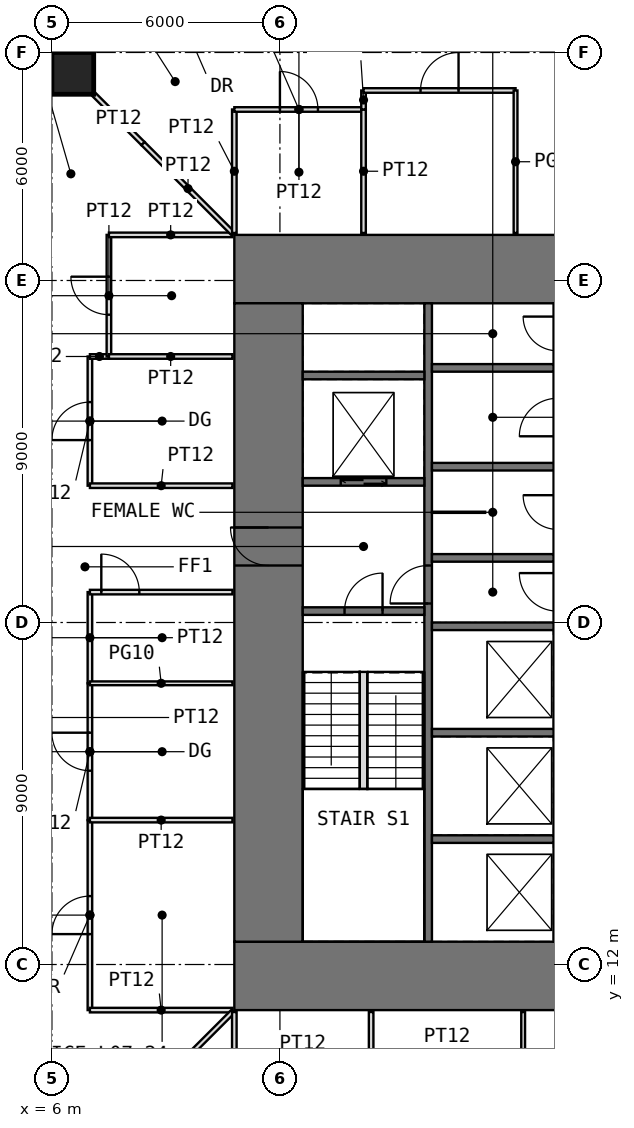
"""IFC4 building model, lengths in metres.
Left out: names, types, materials, properties, quantities, classifications, styles, units other than length and angle.
Written with IfcOpenShell. Run it as: python <this file> out.ifc"""

import sys

from ifc_helpers import new_model, si_unit, direction, frame, frame_2d, origin, origin_2d, place, context, subcontext, project, spatial, rectangle, extrude, element, fill, save


model = new_model("IFC4")
c1 = context("Model", 3, precision=1e-05, world=origin(), true_north=direction((0.0, 1.0)))
c2 = subcontext(c1, "Body", "Model", "MODEL_VIEW")
j1 = project(units=[si_unit("LENGTHUNIT", "METRE"), si_unit("PLANEANGLEUNIT", "RADIAN")], contexts=[c1])
p1 = place(None, origin())
s1 = spatial("IfcSite", under=j1, at=p1, CompositionType="ELEMENT")
p2 = place(p1, origin())
s2 = spatial("IfcBuilding", under=s1, at=p2, CompositionType="ELEMENT")
p3 = place(p2, frame((0.0, 0.0, 34.5)))
s3 = spatial("IfcBuildingStorey", under=s2, at=p3, CompositionType="ELEMENT", Elevation=34.5)
p4 = place(p3, frame((6.55, 35.45, 0.0), z_axis=(0.0, 0.0, 1.0), x_axis=(1.0, 0.0, 0.0)))
e1 = element("IfcColumn", 1, at=p4, inside=s3, PredefinedType="COLUMN", context=c2, shape_type="SweptSolid", body=[
    extrude(rectangle(XDim=1.1, YDim=1.1, at=origin_2d()), origin(), (0.0, 0.0, 1.0), 4.0),
])
p5 = place(p3, frame((10.8, 11.7, -0.05), z_axis=(0.0, 0.0, 1.0), x_axis=(1.0, 0.0, 0.0)))
e2 = element("IfcWall", 2, at=p5, inside=s3, PredefinedType="SHEAR", context=c2, shape_type="SweptSolid", body=[
    extrude(rectangle(XDim=20.4, YDim=1.8, at=frame_2d((10.2, 0.0))), origin(), (0.0, 0.0, 1.0), 4.0),
])
p6 = place(p5, frame((9.2, 0.0, 0.05)))
e3 = element("IfcOpeningElement", 3, at=p6, cuts=e2, PredefinedType="OPENING", context=c2, shape_type="SweptSolid", body=[
    extrude(rectangle(XDim=2.0, YDim=2.2, at=frame_2d((1.0, 1.1))), frame((0.0, 0.91, 0.0), z_axis=(0.0, -1.0, 0.0), x_axis=(1.0, 0.0, 0.0)), (0.0, 0.0, 1.0), 1.82),
])
p7 = place(p3, frame((10.8, 30.3, -0.05), z_axis=(0.0, 0.0, 1.0), x_axis=(1.0, 0.0, 0.0)))
e4 = element("IfcWall", 4, at=p7, inside=s3, PredefinedType="SHEAR", context=c2, shape_type="SweptSolid", body=[
    extrude(rectangle(XDim=20.4, YDim=1.8, at=frame_2d((10.2, 0.0))), origin(), (0.0, 0.0, 1.0), 4.0),
])
p8 = place(p7, frame((9.2, 0.0, 0.05)))
e5 = element("IfcOpeningElement", 5, at=p8, cuts=e4, PredefinedType="OPENING", context=c2, shape_type="SweptSolid", body=[
    extrude(rectangle(XDim=2.0, YDim=2.2, at=frame_2d((1.0, 1.1))), frame((0.0, 0.91, 0.0), z_axis=(0.0, -1.0, 0.0), x_axis=(1.0, 0.0, 0.0)), (0.0, 0.0, 1.0), 1.82),
])
p9 = place(p3, frame((11.7, 12.6, -0.05), z_axis=(0.0, 0.0, 1.0), x_axis=(0.0, 1.0, 0.0)))
e6 = element("IfcWall", 6, at=p9, inside=s3, PredefinedType="SHEAR", context=c2, shape_type="SweptSolid", body=[
    extrude(rectangle(XDim=16.8, YDim=1.8, at=frame_2d((8.4, 0.0))), origin(), (0.0, 0.0, 1.0), 4.0),
])
p10 = place(p9, frame((9.9, 0.0, 0.05)))
e7 = element("IfcOpeningElement", 7, at=p10, cuts=e6, PredefinedType="OPENING", context=c2, shape_type="SweptSolid", body=[
    extrude(rectangle(XDim=1.0, YDim=2.2, at=frame_2d((0.5, 1.1))), frame((0.0, 0.91, 0.0), z_axis=(0.0, -1.0, 0.0), x_axis=(1.0, 0.0, 0.0)), (0.0, 0.0, 1.0), 1.82),
])
p11 = place(p3, frame((15.9, 12.6, -0.05), z_axis=(0.0, 0.0, 1.0), x_axis=(0.0, 1.0, 0.0)))
e8 = element("IfcWall", 8, at=p11, inside=s3, PredefinedType="SHEAR", context=c2, shape_type="SweptSolid", body=[
    extrude(rectangle(XDim=16.8, YDim=0.2, at=frame_2d((8.4, 0.0))), origin(), (0.0, 0.0, 1.0), 4.0),
])
p12 = place(p11, frame((8.9, 0.0, 0.05)))
e9 = element("IfcOpeningElement", 9, at=p12, cuts=e8, PredefinedType="OPENING", context=c2, shape_type="SweptSolid", body=[
    extrude(rectangle(XDim=1.0, YDim=2.2, at=frame_2d((0.5, 1.1))), frame((0.0, 0.11, 0.0), z_axis=(0.0, -1.0, 0.0), x_axis=(1.0, 0.0, 0.0)), (0.0, 0.0, 1.0), 0.22),
])
p13 = place(p3, frame((12.6, 21.3, -0.05), z_axis=(0.0, 0.0, 1.0), x_axis=(1.0, 0.0, 0.0)))
e10 = element("IfcWall", 10, at=p13, inside=s3, PredefinedType="SHEAR", context=c2, shape_type="SweptSolid", body=[
    extrude(rectangle(XDim=3.2, YDim=0.2, at=frame_2d((1.6, 0.0))), origin(), (0.0, 0.0, 1.0), 4.0),
])
p14 = place(p13, frame((1.1, 0.0, 0.05)))
e11 = element("IfcOpeningElement", 11, at=p14, cuts=e10, PredefinedType="OPENING", context=c2, shape_type="SweptSolid", body=[
    extrude(rectangle(XDim=1.0, YDim=2.2, at=frame_2d((0.5, 1.1))), frame((0.0, 0.11, 0.0), z_axis=(0.0, -1.0, 0.0), x_axis=(1.0, 0.0, 0.0)), (0.0, 0.0, 1.0), 0.22),
])
p15 = place(p3, frame((12.6, 24.7, -0.05), z_axis=(0.0, 0.0, 1.0), x_axis=(1.0, 0.0, 0.0)))
e12 = element("IfcWall", 12, at=p15, inside=s3, PredefinedType="SHEAR", context=c2, shape_type="SweptSolid", body=[
    extrude(rectangle(XDim=3.2, YDim=0.2, at=frame_2d((1.6, 0.0))), origin(), (0.0, 0.0, 1.0), 4.0),
])
p16 = place(p15, frame((1.0, 0.0, 0.05)))
e13 = element("IfcOpeningElement", 13, at=p16, cuts=e12, PredefinedType="OPENING", context=c2, shape_type="SweptSolid", body=[
    extrude(rectangle(XDim=1.2, YDim=2.2, at=frame_2d((0.6, 1.1))), frame((0.0, 0.11, 0.0), z_axis=(0.0, -1.0, 0.0), x_axis=(1.0, 0.0, 0.0)), (0.0, 0.0, 1.0), 0.22),
])
for number, where, z_axis, x_axis in (
    (14, (12.6, 27.5, -0.05), (0.0, 0.0, 1.0), (1.0, 0.0, 0.0)),
    (15, (16.0, 15.3, -0.05), (0.0, 0.0, 1.0), (1.0, 0.0, 0.0)),
    (16, (16.0, 18.1, -0.05), (0.0, 0.0, 1.0), (1.0, 0.0, 0.0)),
    (17, (16.0, 20.9, -0.05), (0.0, 0.0, 1.0), (1.0, 0.0, 0.0)),
    (18, (16.0, 22.7, -0.05), (0.0, 0.0, 1.0), (1.0, 0.0, 0.0)),
    (19, (16.0, 25.1, -0.05), (0.0, 0.0, 1.0), (1.0, 0.0, 0.0)),
    (20, (16.0, 27.7, -0.05), (0.0, 0.0, 1.0), (1.0, 0.0, 0.0)),
):
    element("IfcWall", number, at=place(p3, frame(where, z_axis=z_axis, x_axis=x_axis)), inside=s3, PredefinedType="SHEAR", context=c2, shape_type="SweptSolid", body=[
        extrude(rectangle(XDim=3.2, YDim=0.2, at=frame_2d((1.6, 0.0))), origin(), (0.0, 0.0, 1.0), 4.0),
    ])
p17 = place(p3, frame((16.0, 23.9, 0.0), z_axis=(0.0, 0.0, 1.0), x_axis=(1.0, 0.0, 0.0)))
e21 = element("IfcWall", 21, at=p17, inside=s3, PredefinedType="PARTITIONING", context=c2, shape_type="SweptSolid", body=[
    extrude(rectangle(XDim=1.4, YDim=0.03, at=frame_2d((0.7, 0.0))), origin(), (0.0, 0.0, 1.0), 3.75),
])
p18 = place(p3, frame((7.0, 10.8, 0.0), z_axis=(0.0, 0.0, 1.0), x_axis=(0.0, 1.0, 0.0)))
e22 = element("IfcWall", 22, at=p18, inside=s3, PredefinedType="PARTITIONING", context=c2, shape_type="SweptSolid", body=[
    extrude(rectangle(XDim=5.0, YDim=0.12, at=frame_2d((2.5, 0.0))), origin(), (0.0, 0.0, 1.0), 3.75),
])
p19 = place(p18, frame((2.0, 0.0, 0.0)))
e23 = element("IfcOpeningElement", 23, at=p19, cuts=e22, PredefinedType="OPENING", context=c2, shape_type="SweptSolid", body=[
    extrude(rectangle(XDim=1.0, YDim=2.2, at=frame_2d((0.5, 1.1))), frame((0.0, 0.07, 0.0), z_axis=(0.0, -1.0, 0.0), x_axis=(1.0, 0.0, 0.0)), (0.0, 0.0, 1.0), 0.14),
])
p20 = place(p3, frame((7.0, 10.8, 0.0), z_axis=(0.0, 0.0, 1.0), x_axis=(1.0, 0.0, 0.0)))
e24 = element("IfcWall", 24, at=p20, inside=s3, PredefinedType="PARTITIONING", context=c2, shape_type="SweptSolid", body=[
    extrude(rectangle(XDim=3.75, YDim=0.12, at=frame_2d((1.875, 0.0))), origin(), (0.0, 0.0, 1.0), 3.75),
])
p21 = place(p3, frame((7.0, 15.8, 0.0), z_axis=(0.0, 0.0, 1.0), x_axis=(0.0, 1.0, 0.0)))
e25 = element("IfcWall", 25, at=p21, inside=s3, PredefinedType="PARTITIONING", context=c2, shape_type="SweptSolid", body=[
    extrude(rectangle(XDim=3.6, YDim=0.12, at=frame_2d((1.8, 0.0))), origin(), (0.0, 0.0, 1.0), 3.75),
])
p22 = place(p21, frame((1.3, 0.0, 0.0)))
e26 = element("IfcOpeningElement", 26, at=p22, cuts=e25, PredefinedType="OPENING", context=c2, shape_type="SweptSolid", body=[
    extrude(rectangle(XDim=1.0, YDim=2.4, at=frame_2d((0.5, 1.2))), frame((0.0, 0.07, 0.0), z_axis=(0.0, -1.0, 0.0), x_axis=(1.0, 0.0, 0.0)), (0.0, 0.0, 1.0), 0.14),
])
p23 = place(p3, frame((7.0, 15.8, 0.0), z_axis=(0.0, 0.0, 1.0), x_axis=(1.0, 0.0, 0.0)))
e27 = element("IfcWall", 27, at=p23, inside=s3, PredefinedType="PARTITIONING", context=c2, shape_type="SweptSolid", body=[
    extrude(rectangle(XDim=3.75, YDim=0.12, at=frame_2d((1.875, 0.0))), origin(), (0.0, 0.0, 1.0), 3.75),
])
p24 = place(p3, frame((7.0, 19.4, 0.0), z_axis=(0.0, 0.0, 1.0), x_axis=(0.0, 1.0, 0.0)))
e28 = element("IfcWall", 28, at=p24, inside=s3, PredefinedType="PARTITIONING", context=c2, shape_type="SweptSolid", body=[
    extrude(rectangle(XDim=2.4, YDim=0.12, at=frame_2d((1.2, 0.0))), origin(), (0.0, 0.0, 1.0), 3.75),
])
p25 = place(p3, frame((7.0, 19.4, 0.0), z_axis=(0.0, 0.0, 1.0), x_axis=(1.0, 0.0, 0.0)))
e29 = element("IfcWall", 29, at=p25, inside=s3, PredefinedType="PARTITIONING", context=c2, shape_type="SweptSolid", body=[
    extrude(rectangle(XDim=3.75, YDim=0.1, at=frame_2d((1.875, 0.0))), origin(), (0.0, 0.0, 1.0), 3.75),
])
p26 = place(p3, frame((7.0, 21.8, 0.0), z_axis=(0.0, 0.0, 1.0), x_axis=(1.0, 0.0, 0.0)))
e30 = element("IfcWall", 30, at=p26, inside=s3, PredefinedType="PARTITIONING", context=c2, shape_type="SweptSolid", body=[
    extrude(rectangle(XDim=3.75, YDim=0.12, at=frame_2d((1.875, 0.0))), origin(), (0.0, 0.0, 1.0), 3.75),
])
p27 = place(p26, frame((0.3, 0.0, 0.0)))
e31 = element("IfcOpeningElement", 31, at=p27, cuts=e30, PredefinedType="OPENING", context=c2, shape_type="SweptSolid", body=[
    extrude(rectangle(XDim=1.0, YDim=2.4, at=frame_2d((0.5, 1.2))), frame((0.0, 0.07, 0.0), z_axis=(0.0, -1.0, 0.0), x_axis=(1.0, 0.0, 0.0)), (0.0, 0.0, 1.0), 0.14),
])
p28 = place(p3, frame((7.0, 24.6, 0.0), z_axis=(0.0, 0.0, 1.0), x_axis=(0.0, 1.0, 0.0)))
e32 = element("IfcWall", 32, at=p28, inside=s3, PredefinedType="PARTITIONING", context=c2, shape_type="SweptSolid", body=[
    extrude(rectangle(XDim=3.4, YDim=0.12, at=frame_2d((1.7, 0.0))), origin(), (0.0, 0.0, 1.0), 3.75),
])
p29 = place(p28, frame((1.2, 0.0, 0.0)))
e33 = element("IfcOpeningElement", 33, at=p29, cuts=e32, PredefinedType="OPENING", context=c2, shape_type="SweptSolid", body=[
    extrude(rectangle(XDim=1.0, YDim=2.4, at=frame_2d((0.5, 1.2))), frame((0.0, 0.07, 0.0), z_axis=(0.0, -1.0, 0.0), x_axis=(1.0, 0.0, 0.0)), (0.0, 0.0, 1.0), 0.14),
])
p30 = place(p3, frame((7.0, 24.6, 0.0), z_axis=(0.0, 0.0, 1.0), x_axis=(1.0, 0.0, 0.0)))
e34 = element("IfcWall", 34, at=p30, inside=s3, PredefinedType="PARTITIONING", context=c2, shape_type="SweptSolid", body=[
    extrude(rectangle(XDim=3.75, YDim=0.12, at=frame_2d((1.875, 0.0))), origin(), (0.0, 0.0, 1.0), 3.75),
])
p31 = place(p3, frame((7.0, 28.0, 0.0), z_axis=(0.0, 0.0, 1.0), x_axis=(1.0, 0.0, 0.0)))
e35 = element("IfcWall", 35, at=p31, inside=s3, PredefinedType="PARTITIONING", context=c2, shape_type="SweptSolid", body=[
    extrude(rectangle(XDim=0.5, YDim=0.12, at=frame_2d((0.25, 0.0))), origin(), (0.0, 0.0, 1.0), 3.75),
])
p32 = place(p3, frame((7.11, 7.11, 0.0), z_axis=(0.0, 0.0, 1.0), x_axis=(0.707106781187, 0.707106781187, 0.0)))
e36 = element("IfcWall", 36, at=p32, inside=s3, PredefinedType="PARTITIONING", context=c2, shape_type="SweptSolid", body=[
    extrude(rectangle(XDim=5.168, YDim=0.12, at=frame_2d((2.584, 0.0))), origin(), (0.0, 0.0, 1.0), 3.75),
])
p33 = place(p3, frame((7.11, 34.89, 0.0), z_axis=(0.0, 0.0, 1.0), x_axis=(0.707106781187, -0.707106781187, 0.0)))
e37 = element("IfcWall", 37, at=p33, inside=s3, PredefinedType="PARTITIONING", context=c2, shape_type="SweptSolid", body=[
    extrude(rectangle(XDim=1.822, YDim=0.12, at=frame_2d((0.911, 0.0))), origin(), (0.0, 0.0, 1.0), 3.75),
])
p34 = place(p3, frame((7.5, 28.0, 0.0), z_axis=(0.0, 0.0, 1.0), x_axis=(0.0, 1.0, 0.0)))
e38 = element("IfcWall", 38, at=p34, inside=s3, PredefinedType="PARTITIONING", context=c2, shape_type="SweptSolid", body=[
    extrude(rectangle(XDim=3.2, YDim=0.12, at=frame_2d((1.6, 0.0))), origin(), (0.0, 0.0, 1.0), 3.75),
])
p35 = place(p34, frame((1.1, 0.0, 0.0)))
e39 = element("IfcOpeningElement", 39, at=p35, cuts=e38, PredefinedType="OPENING", context=c2, shape_type="SweptSolid", body=[
    extrude(rectangle(XDim=1.0, YDim=2.2, at=frame_2d((0.5, 1.1))), frame((0.0, 0.07, 0.0), z_axis=(0.0, -1.0, 0.0), x_axis=(1.0, 0.0, 0.0)), (0.0, 0.0, 1.0), 0.14),
])
for number, where, z_axis, x_axis in (
    (40, (7.5, 28.0, 0.0), (0.0, 0.0, 1.0), (1.0, 0.0, 0.0)),
    (41, (7.5, 31.2, 0.0), (0.0, 0.0, 1.0), (1.0, 0.0, 0.0)),
):
    element("IfcWall", number, at=place(p3, frame(where, z_axis=z_axis, x_axis=x_axis)), inside=s3, PredefinedType="PARTITIONING", context=c2, shape_type="SweptSolid", body=[
        extrude(rectangle(XDim=3.25, YDim=0.12, at=frame_2d((1.625, 0.0))), origin(), (0.0, 0.0, 1.0), 3.75),
    ])
p36 = place(p3, frame((8.398, 33.602, 0.0), z_axis=(0.0, 0.0, 1.0), x_axis=(0.707106781187, -0.707106781187, 0.0)))
e42 = element("IfcWall", 42, at=p36, inside=s3, PredefinedType="PARTITIONING", context=c2, shape_type="SweptSolid", body=[
    extrude(rectangle(XDim=3.346, YDim=0.12, at=frame_2d((1.673, 0.0))), origin(), (0.0, 0.0, 1.0), 3.75),
])
p37 = place(p3, frame((10.8, 7.7, 0.0), z_axis=(0.0, 0.0, 1.0), x_axis=(0.0, 1.0, 0.0)))
e43 = element("IfcWall", 43, at=p37, inside=s3, PredefinedType="PARTITIONING", context=c2, shape_type="SweptSolid", body=[
    extrude(rectangle(XDim=3.05, YDim=0.12, at=frame_2d((1.525, 0.0))), origin(), (0.0, 0.0, 1.0), 3.75),
])
p38 = place(p3, frame((10.8, 31.25, 0.0), z_axis=(0.0, 0.0, 1.0), x_axis=(0.0, 1.0, 0.0)))
e44 = element("IfcWall", 44, at=p38, inside=s3, PredefinedType="PARTITIONING", context=c2, shape_type="SweptSolid", body=[
    extrude(rectangle(XDim=3.25, YDim=0.12, at=frame_2d((1.625, 0.0))), origin(), (0.0, 0.0, 1.0), 3.75),
])
p39 = place(p3, frame((10.8, 34.5, 0.0), z_axis=(0.0, 0.0, 1.0), x_axis=(1.0, 0.0, 0.0)))
e45 = element("IfcWall", 45, at=p39, inside=s3, PredefinedType="PARTITIONING", context=c2, shape_type="SweptSolid", body=[
    extrude(rectangle(XDim=3.4, YDim=0.12, at=frame_2d((1.7, 0.0))), origin(), (0.0, 0.0, 1.0), 3.75),
])
p40 = place(p39, frame((1.2, 0.0, 0.0)))
e46 = element("IfcOpeningElement", 46, at=p40, cuts=e45, PredefinedType="OPENING", context=c2, shape_type="SweptSolid", body=[
    extrude(rectangle(XDim=1.0, YDim=2.2, at=frame_2d((0.5, 1.1))), frame((0.0, 0.07, 0.0), z_axis=(0.0, -1.0, 0.0), x_axis=(1.0, 0.0, 0.0)), (0.0, 0.0, 1.0), 0.14),
])
p41 = place(p3, frame((14.2, 31.25, 0.0), z_axis=(0.0, 0.0, 1.0), x_axis=(0.0, 1.0, 0.0)))
e47 = element("IfcWall", 47, at=p41, inside=s3, PredefinedType="PARTITIONING", context=c2, shape_type="SweptSolid", body=[
    extrude(rectangle(XDim=3.25, YDim=0.12, at=frame_2d((1.625, 0.0))), origin(), (0.0, 0.0, 1.0), 3.75),
])
p42 = place(p3, frame((14.2, 34.5, 0.0), z_axis=(0.0, 0.0, 1.0), x_axis=(0.0, 1.0, 0.0)))
e48 = element("IfcWall", 48, at=p42, inside=s3, PredefinedType="PARTITIONING", context=c2, shape_type="SweptSolid", body=[
    extrude(rectangle(XDim=0.5, YDim=0.12, at=frame_2d((0.25, 0.0))), origin(), (0.0, 0.0, 1.0), 3.75),
])
p43 = place(p3, frame((14.2, 35.0, 0.0), z_axis=(0.0, 0.0, 1.0), x_axis=(1.0, 0.0, 0.0)))
e49 = element("IfcWall", 49, at=p43, inside=s3, PredefinedType="PARTITIONING", context=c2, shape_type="SweptSolid", body=[
    extrude(rectangle(XDim=4.0, YDim=0.12, at=frame_2d((2.0, 0.0))), origin(), (0.0, 0.0, 1.0), 3.75),
])
p44 = place(p43, frame((1.5, 0.0, 0.0)))
e50 = element("IfcOpeningElement", 50, at=p44, cuts=e49, PredefinedType="OPENING", context=c2, shape_type="SweptSolid", body=[
    extrude(rectangle(XDim=1.0, YDim=2.4, at=frame_2d((0.5, 1.2))), frame((0.0, 0.07, 0.0), z_axis=(0.0, -1.0, 0.0), x_axis=(1.0, 0.0, 0.0)), (0.0, 0.0, 1.0), 0.14),
])
p45 = place(p3, frame((14.4, 7.7, 0.0), z_axis=(0.0, 0.0, 1.0), x_axis=(0.0, 1.0, 0.0)))
e51 = element("IfcWall", 51, at=p45, inside=s3, PredefinedType="PARTITIONING", context=c2, shape_type="SweptSolid", body=[
    extrude(rectangle(XDim=3.05, YDim=0.12, at=frame_2d((1.525, 0.0))), origin(), (0.0, 0.0, 1.0), 3.75),
])
p46 = place(p3, frame((18.2, 31.25, 0.0), z_axis=(0.0, 0.0, 1.0), x_axis=(0.0, 1.0, 0.0)))
e52 = element("IfcWall", 52, at=p46, inside=s3, PredefinedType="PARTITIONING", context=c2, shape_type="SweptSolid", body=[
    extrude(rectangle(XDim=3.75, YDim=0.1, at=frame_2d((1.875, 0.0))), origin(), (0.0, 0.0, 1.0), 3.75),
])
p47 = place(p3, frame((18.4, 7.2, 0.0), z_axis=(0.0, 0.0, 1.0), x_axis=(0.0, 1.0, 0.0)))
e53 = element("IfcWall", 53, at=p47, inside=s3, PredefinedType="PARTITIONING", context=c2, shape_type="SweptSolid", body=[
    extrude(rectangle(XDim=3.55, YDim=0.1, at=frame_2d((1.775, 0.0))), origin(), (0.0, 0.0, 1.0), 3.75),
])
p48 = place(p3, frame((14.2, 16.62, 0.0), z_axis=(0.0, 0.0, 1.0), x_axis=(0.0, 1.0, 0.0)))
e54 = element("IfcWall", 54, at=p48, inside=s3, PredefinedType="PARTITIONING", context=c2, shape_type="SweptSolid", body=[
    extrude(rectangle(XDim=3.08, YDim=0.2, at=frame_2d((1.54, 0.0))), origin(), (0.0, 0.0, 1.0), 4.0),
])
p49 = place(p10, origin())
e55 = element("IfcDoor", 55, at=p49, inside=s3, OperationType="SINGLE_SWING_RIGHT", PredefinedType="DOOR", context=c2, shape_type="SweptSolid", body=[
    extrude(rectangle(XDim=1.0, YDim=2.2, at=frame_2d((0.5, 1.1))), frame((0.0, 0.025, 0.0), z_axis=(0.0, -1.0, 0.0), x_axis=(1.0, 0.0, 0.0)), (0.0, 0.0, 1.0), 0.05),
])
fill(e7, e55)
p50 = place(p14, origin())
e56 = element("IfcDoor", 56, at=p50, inside=s3, OperationType="SINGLE_SWING_RIGHT", PredefinedType="DOOR", context=c2, shape_type="SweptSolid", body=[
    extrude(rectangle(XDim=1.0, YDim=2.2, at=frame_2d((0.5, 1.1))), frame((0.0, 0.025, 0.0), z_axis=(0.0, -1.0, 0.0), x_axis=(1.0, 0.0, 0.0)), (0.0, 0.0, 1.0), 0.05),
])
fill(e11, e56)
p51 = place(p12, origin())
e57 = element("IfcDoor", 57, at=p51, inside=s3, OperationType="SINGLE_SWING_LEFT", PredefinedType="DOOR", context=c2, shape_type="SweptSolid", body=[
    extrude(rectangle(XDim=1.0, YDim=2.2, at=frame_2d((0.5, 1.1))), frame((0.0, 0.025, 0.0), z_axis=(0.0, -1.0, 0.0), x_axis=(1.0, 0.0, 0.0)), (0.0, 0.0, 1.0), 0.05),
])
fill(e9, e57)
p52 = place(p40, origin())
e58 = element("IfcDoor", 58, at=p52, inside=s3, OperationType="SINGLE_SWING_LEFT", PredefinedType="DOOR", context=c2, shape_type="SweptSolid", body=[
    extrude(rectangle(XDim=1.0, YDim=2.2, at=frame_2d((0.5, 1.1))), frame((0.0, 0.025, 0.0), z_axis=(0.0, -1.0, 0.0), x_axis=(1.0, 0.0, 0.0)), (0.0, 0.0, 1.0), 0.05),
])
fill(e46, e58)
p53 = place(p44, origin())
e59 = element("IfcDoor", 59, at=p53, inside=s3, OperationType="SINGLE_SWING_RIGHT", PredefinedType="DOOR", context=c2, shape_type="SweptSolid", body=[
    extrude(rectangle(XDim=1.0, YDim=2.4, at=frame_2d((0.5, 1.2))), frame((0.0, 0.025, 0.0), z_axis=(0.0, -1.0, 0.0), x_axis=(1.0, 0.0, 0.0)), (0.0, 0.0, 1.0), 0.05),
])
fill(e50, e59)
p54 = place(p19, origin())
e60 = element("IfcDoor", 60, at=p54, inside=s3, OperationType="SINGLE_SWING_LEFT", PredefinedType="DOOR", context=c2, shape_type="SweptSolid", body=[
    extrude(rectangle(XDim=1.0, YDim=2.2, at=frame_2d((0.5, 1.1))), frame((0.0, 0.025, 0.0), z_axis=(0.0, -1.0, 0.0), x_axis=(1.0, 0.0, 0.0)), (0.0, 0.0, 1.0), 0.05),
])
fill(e23, e60)
p55 = place(p22, origin())
e61 = element("IfcDoor", 61, at=p55, inside=s3, OperationType="SINGLE_SWING_RIGHT", PredefinedType="DOOR", context=c2, shape_type="SweptSolid", body=[
    extrude(rectangle(XDim=1.0, YDim=2.4, at=frame_2d((0.5, 1.2))), frame((0.0, 0.025, 0.0), z_axis=(0.0, -1.0, 0.0), x_axis=(1.0, 0.0, 0.0)), (0.0, 0.0, 1.0), 0.05),
])
fill(e26, e61)
p56 = place(p29, origin())
e62 = element("IfcDoor", 62, at=p56, inside=s3, OperationType="SINGLE_SWING_LEFT", PredefinedType="DOOR", context=c2, shape_type="SweptSolid", body=[
    extrude(rectangle(XDim=1.0, YDim=2.4, at=frame_2d((0.5, 1.2))), frame((0.0, 0.025, 0.0), z_axis=(0.0, -1.0, 0.0), x_axis=(1.0, 0.0, 0.0)), (0.0, 0.0, 1.0), 0.05),
])
fill(e33, e62)
p57 = place(p35, origin())
e63 = element("IfcDoor", 63, at=p57, inside=s3, OperationType="SINGLE_SWING_RIGHT", PredefinedType="DOOR", context=c2, shape_type="SweptSolid", body=[
    extrude(rectangle(XDim=1.0, YDim=2.2, at=frame_2d((0.5, 1.1))), frame((0.0, 0.025, 0.0), z_axis=(0.0, -1.0, 0.0), x_axis=(1.0, 0.0, 0.0)), (0.0, 0.0, 1.0), 0.05),
])
fill(e39, e63)
p58 = place(p27, origin())
e64 = element("IfcDoor", 64, at=p58, inside=s3, OperationType="SINGLE_SWING_LEFT", PredefinedType="DOOR", context=c2, shape_type="SweptSolid", body=[
    extrude(rectangle(XDim=1.0, YDim=2.4, at=frame_2d((0.5, 1.2))), frame((0.0, 0.025, 0.0), z_axis=(0.0, -1.0, 0.0), x_axis=(1.0, 0.0, 0.0)), (0.0, 0.0, 1.0), 0.05),
])
fill(e31, e64)
p59 = place(p16, origin())
e65 = element("IfcDoor", 65, at=p59, inside=s3, OperationType="DOUBLE_DOOR_SLIDING", PredefinedType="DOOR", context=c2, shape_type="SweptSolid", body=[
    extrude(rectangle(XDim=1.2, YDim=2.2, at=frame_2d((0.6, 1.1))), frame((0.0, 0.025, 0.0), z_axis=(0.0, -1.0, 0.0), x_axis=(1.0, 0.0, 0.0)), (0.0, 0.0, 1.0), 0.05),
])
fill(e13, e65)
save(model, sys.argv[1])
